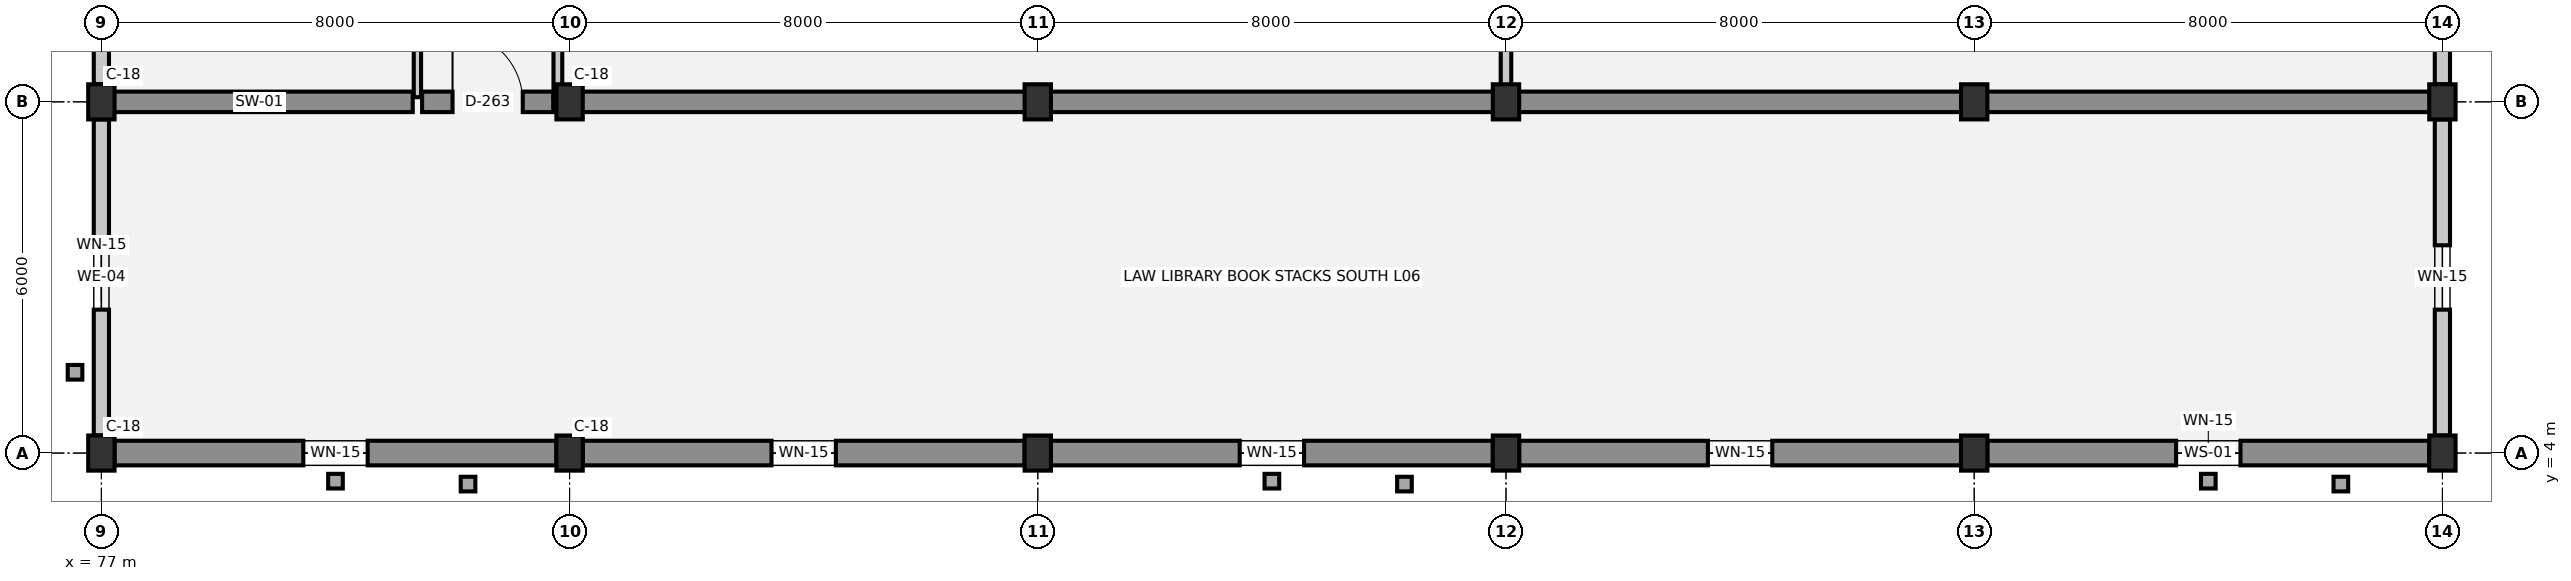
"""IFC4 building model, lengths in metres.
Left out: names, types, materials, properties, quantities, classifications, styles, units other than length and angle.
Written with IfcOpenShell. Run it as: python <this file> out.ifc"""

import sys

from ifc_helpers import new_model, si_unit, direction, frame, frame_2d, origin, origin_2d, place, context, subcontext, project, spatial, rectangle, extrude, element, fill, save


model = new_model("IFC4")
c1 = context("Model", 3, precision=1e-05, world=origin(), true_north=direction((0.0, 1.0)))
c2 = subcontext(c1, "Body", "Model", "MODEL_VIEW")
j1 = project(units=[si_unit("LENGTHUNIT", "METRE"), si_unit("PLANEANGLEUNIT", "RADIAN")], contexts=[c1])
p1 = place(None, origin())
s1 = spatial("IfcSite", under=j1, at=p1, CompositionType="ELEMENT")
p2 = place(p1, origin())
s2 = spatial("IfcBuilding", under=s1, at=p2, CompositionType="ELEMENT")
p3 = place(p2, frame((0.0, 0.0, 22.05)))
s3 = spatial("IfcBuildingStorey", under=s2, at=p3, CompositionType="ELEMENT", Elevation=22.05)
for number, where, z_axis, x_axis in (
    (1, (77.0, 4.0, 0.0), (0.0, 0.0, 1.0), (1.0, 0.0, 0.0)),
    (2, (77.0, 10.0, 0.0), (0.0, 0.0, 1.0), (1.0, 0.0, 0.0)),
    (3, (85.0, 4.0, 0.0), (0.0, 0.0, 1.0), (1.0, 0.0, 0.0)),
    (4, (85.0, 10.0, 0.0), (0.0, 0.0, 1.0), (1.0, 0.0, 0.0)),
    (5, (93.0, 4.0, 0.0), (0.0, 0.0, 1.0), (1.0, 0.0, 0.0)),
    (6, (93.0, 10.0, 0.0), (0.0, 0.0, 1.0), (1.0, 0.0, 0.0)),
    (7, (101.0, 4.0, 0.0), (0.0, 0.0, 1.0), (1.0, 0.0, 0.0)),
    (8, (101.0, 10.0, 0.0), (0.0, 0.0, 1.0), (1.0, 0.0, 0.0)),
    (9, (109.0, 4.0, 0.0), (0.0, 0.0, 1.0), (1.0, 0.0, 0.0)),
    (10, (109.0, 10.0, 0.0), (0.0, 0.0, 1.0), (1.0, 0.0, 0.0)),
    (11, (117.0, 4.0, 0.0), (0.0, 0.0, 1.0), (1.0, 0.0, 0.0)),
    (12, (117.0, 10.0, 0.0), (0.0, 0.0, 1.0), (1.0, 0.0, 0.0)),
):
    element("IfcColumn", number, at=place(p3, frame(where, z_axis=z_axis, x_axis=x_axis)), inside=s3, PredefinedType="COLUMN", context=c2, shape_type="SweptSolid", body=[
        extrude(rectangle(XDim=0.45, YDim=0.6, at=origin_2d()), origin(), (0.0, 0.0, 1.0), 3.75),
    ])
p4 = place(p3, frame((77.0, 4.3, 0.0), z_axis=(0.0, 0.0, 1.0), x_axis=(0.0, 1.0, 0.0)))
e13 = element("IfcWall", 13, at=p4, inside=s3, PredefinedType="SOLIDWALL", context=c2, shape_type="SweptSolid", body=[
    extrude(rectangle(XDim=5.4, YDim=0.26, at=frame_2d((2.7, 0.0))), origin(), (0.0, 0.0, 1.0), 2.71),
])
p5 = place(p4, frame((2.15, 0.0, 0.9)))
e14 = element("IfcOpeningElement", 14, at=p5, cuts=e13, PredefinedType="OPENING", context=c2, shape_type="SweptSolid", body=[
    extrude(rectangle(XDim=1.1, YDim=1.2, at=frame_2d((0.55, 0.6))), frame((0.0, 0.14, 0.0), z_axis=(0.0, -1.0, 0.0), x_axis=(1.0, 0.0, 0.0)), (0.0, 0.0, 1.0), 0.28),
])
p6 = place(p3, frame((77.0, 10.3, 0.0), z_axis=(0.0, 0.0, 1.0), x_axis=(0.0, 1.0, 0.0)))
e15 = element("IfcWall", 15, at=p6, inside=s3, PredefinedType="SOLIDWALL", context=c2, shape_type="SweptSolid", body=[
    extrude(rectangle(XDim=6.4, YDim=0.26, at=frame_2d((3.2, 0.0))), origin(), (0.0, 0.0, 1.0), 2.71),
])
p7 = place(p6, frame((2.1, 0.0, 0.9)))
e16 = element("IfcOpeningElement", 16, at=p7, cuts=e15, PredefinedType="OPENING", context=c2, shape_type="SweptSolid", body=[
    extrude(rectangle(XDim=2.2, YDim=1.0, at=frame_2d((1.1, 0.5))), frame((0.0, 0.14, 0.0), z_axis=(0.0, -1.0, 0.0), x_axis=(1.0, 0.0, 0.0)), (0.0, 0.0, 1.0), 0.28),
])
p8 = place(p3, frame((117.0, 16.7, 0.0), z_axis=(0.0, 0.0, 1.0), x_axis=(0.0, -1.0, 0.0)))
e17 = element("IfcWall", 17, at=p8, inside=s3, PredefinedType="SOLIDWALL", context=c2, shape_type="SweptSolid", body=[
    extrude(rectangle(XDim=6.4, YDim=0.26, at=frame_2d((3.2, 0.0))), origin(), (0.0, 0.0, 1.0), 2.71),
])
p9 = place(p8, frame((2.1, 0.0, 0.9)))
e18 = element("IfcOpeningElement", 18, at=p9, cuts=e17, PredefinedType="OPENING", context=c2, shape_type="SweptSolid", body=[
    extrude(rectangle(XDim=2.2, YDim=1.0, at=frame_2d((1.1, 0.5))), frame((0.0, 0.14, 0.0), z_axis=(0.0, -1.0, 0.0), x_axis=(1.0, 0.0, 0.0)), (0.0, 0.0, 1.0), 0.28),
])
p10 = place(p3, frame((117.0, 9.7, 0.0), z_axis=(0.0, 0.0, 1.0), x_axis=(0.0, -1.0, 0.0)))
e19 = element("IfcWall", 19, at=p10, inside=s3, PredefinedType="SOLIDWALL", context=c2, shape_type="SweptSolid", body=[
    extrude(rectangle(XDim=5.4, YDim=0.26, at=frame_2d((2.7, 0.0))), origin(), (0.0, 0.0, 1.0), 2.71),
])
p11 = place(p10, frame((2.15, 0.0, 0.9)))
e20 = element("IfcOpeningElement", 20, at=p11, cuts=e19, PredefinedType="OPENING", context=c2, shape_type="SweptSolid", body=[
    extrude(rectangle(XDim=1.1, YDim=1.2, at=frame_2d((0.55, 0.6))), frame((0.0, 0.14, 0.0), z_axis=(0.0, -1.0, 0.0), x_axis=(1.0, 0.0, 0.0)), (0.0, 0.0, 1.0), 0.28),
])
p12 = place(p3, frame((116.775, 4.0, 0.0), z_axis=(0.0, 0.0, 1.0), x_axis=(-1.0, 0.0, 0.0)))
e21 = element("IfcWall", 21, at=p12, inside=s3, PredefinedType="SOLIDWALL", context=c2, shape_type="SweptSolid", body=[
    extrude(rectangle(XDim=7.55, YDim=0.42, at=frame_2d((3.775, 0.0))), origin(), (0.0, 0.0, 1.0), 2.71),
])
p13 = place(p12, frame((3.225, 0.0, 0.9)))
e22 = element("IfcOpeningElement", 22, at=p13, cuts=e21, PredefinedType="OPENING", context=c2, shape_type="SweptSolid", body=[
    extrude(rectangle(XDim=1.1, YDim=1.2, at=frame_2d((0.55, 0.6))), frame((0.0, 0.22, 0.0), z_axis=(0.0, -1.0, 0.0), x_axis=(1.0, 0.0, 0.0)), (0.0, 0.0, 1.0), 0.44),
])
p14 = place(p3, frame((108.775, 4.0, 0.0), z_axis=(0.0, 0.0, 1.0), x_axis=(-1.0, 0.0, 0.0)))
e23 = element("IfcWall", 23, at=p14, inside=s3, PredefinedType="SOLIDWALL", context=c2, shape_type="SweptSolid", body=[
    extrude(rectangle(XDim=7.55, YDim=0.42, at=frame_2d((3.775, 0.0))), origin(), (0.0, 0.0, 1.0), 2.71),
])
p15 = place(p14, frame((3.225, 0.0, 0.9)))
e24 = element("IfcOpeningElement", 24, at=p15, cuts=e23, PredefinedType="OPENING", context=c2, shape_type="SweptSolid", body=[
    extrude(rectangle(XDim=1.1, YDim=1.2, at=frame_2d((0.55, 0.6))), frame((0.0, 0.22, 0.0), z_axis=(0.0, -1.0, 0.0), x_axis=(1.0, 0.0, 0.0)), (0.0, 0.0, 1.0), 0.44),
])
p16 = place(p3, frame((100.775, 4.0, 0.0), z_axis=(0.0, 0.0, 1.0), x_axis=(-1.0, 0.0, 0.0)))
e25 = element("IfcWall", 25, at=p16, inside=s3, PredefinedType="SOLIDWALL", context=c2, shape_type="SweptSolid", body=[
    extrude(rectangle(XDim=7.55, YDim=0.42, at=frame_2d((3.775, 0.0))), origin(), (0.0, 0.0, 1.0), 2.71),
])
p17 = place(p16, frame((3.225, 0.0, 0.9)))
e26 = element("IfcOpeningElement", 26, at=p17, cuts=e25, PredefinedType="OPENING", context=c2, shape_type="SweptSolid", body=[
    extrude(rectangle(XDim=1.1, YDim=1.2, at=frame_2d((0.55, 0.6))), frame((0.0, 0.22, 0.0), z_axis=(0.0, -1.0, 0.0), x_axis=(1.0, 0.0, 0.0)), (0.0, 0.0, 1.0), 0.44),
])
p18 = place(p3, frame((92.775, 4.0, 0.0), z_axis=(0.0, 0.0, 1.0), x_axis=(-1.0, 0.0, 0.0)))
e27 = element("IfcWall", 27, at=p18, inside=s3, PredefinedType="SOLIDWALL", context=c2, shape_type="SweptSolid", body=[
    extrude(rectangle(XDim=7.55, YDim=0.42, at=frame_2d((3.775, 0.0))), origin(), (0.0, 0.0, 1.0), 2.71),
])
p19 = place(p18, frame((3.225, 0.0, 0.9)))
e28 = element("IfcOpeningElement", 28, at=p19, cuts=e27, PredefinedType="OPENING", context=c2, shape_type="SweptSolid", body=[
    extrude(rectangle(XDim=1.1, YDim=1.2, at=frame_2d((0.55, 0.6))), frame((0.0, 0.22, 0.0), z_axis=(0.0, -1.0, 0.0), x_axis=(1.0, 0.0, 0.0)), (0.0, 0.0, 1.0), 0.44),
])
p20 = place(p3, frame((84.775, 4.0, 0.0), z_axis=(0.0, 0.0, 1.0), x_axis=(-1.0, 0.0, 0.0)))
e29 = element("IfcWall", 29, at=p20, inside=s3, PredefinedType="SOLIDWALL", context=c2, shape_type="SweptSolid", body=[
    extrude(rectangle(XDim=7.55, YDim=0.42, at=frame_2d((3.775, 0.0))), origin(), (0.0, 0.0, 1.0), 2.71),
])
p21 = place(p20, frame((3.225, 0.0, 0.9)))
e30 = element("IfcOpeningElement", 30, at=p21, cuts=e29, PredefinedType="OPENING", context=c2, shape_type="SweptSolid", body=[
    extrude(rectangle(XDim=1.1, YDim=1.2, at=frame_2d((0.55, 0.6))), frame((0.0, 0.22, 0.0), z_axis=(0.0, -1.0, 0.0), x_axis=(1.0, 0.0, 0.0)), (0.0, 0.0, 1.0), 0.44),
])
p22 = place(p3, frame((77.08, 10.0, 0.0), z_axis=(0.0, 0.0, 1.0), x_axis=(1.0, 0.0, 0.0)))
e31 = element("IfcWall", 31, at=p22, inside=s3, PredefinedType="SHEAR", context=c2, shape_type="SweptSolid", body=[
    extrude(rectangle(XDim=5.24, YDim=0.35, at=frame_2d((2.62, 0.0))), origin(), (0.0, 0.0, 1.0), 3.39),
])
p23 = place(p3, frame((82.48, 10.0, 0.0), z_axis=(0.0, 0.0, 1.0), x_axis=(1.0, 0.0, 0.0)))
e32 = element("IfcWall", 32, at=p23, inside=s3, PredefinedType="SHEAR", context=c2, shape_type="SweptSolid", body=[
    extrude(rectangle(XDim=2.24, YDim=0.35, at=frame_2d((1.12, 0.0))), origin(), (0.0, 0.0, 1.0), 3.39),
])
p24 = place(p23, frame((0.52, 0.0, 0.0)))
e33 = element("IfcOpeningElement", 33, at=p24, cuts=e32, PredefinedType="OPENING", context=c2, shape_type="SweptSolid", body=[
    extrude(rectangle(XDim=1.2, YDim=2.15, at=frame_2d((0.6, 1.075))), frame((0.0, 0.185, 0.0), z_axis=(0.0, -1.0, 0.0), x_axis=(1.0, 0.0, 0.0)), (0.0, 0.0, 1.0), 0.37),
])
p25 = place(p3, frame((84.88, 10.0, 0.0), z_axis=(0.0, 0.0, 1.0), x_axis=(1.0, 0.0, 0.0)))
e34 = element("IfcWall", 34, at=p25, inside=s3, PredefinedType="SHEAR", context=c2, shape_type="SweptSolid", body=[
    extrude(rectangle(XDim=16.04, YDim=0.35, at=frame_2d((8.02, 0.0))), origin(), (0.0, 0.0, 1.0), 3.39),
])
p26 = place(p3, frame((101.08, 10.0, 0.0), z_axis=(0.0, 0.0, 1.0), x_axis=(1.0, 0.0, 0.0)))
e35 = element("IfcWall", 35, at=p26, inside=s3, PredefinedType="SHEAR", context=c2, shape_type="SweptSolid", body=[
    extrude(rectangle(XDim=15.84, YDim=0.35, at=frame_2d((7.92, 0.0))), origin(), (0.0, 0.0, 1.0), 3.39),
])
p27 = place(p3, frame((82.4, 10.08, 0.0), z_axis=(0.0, 0.0, 1.0), x_axis=(0.0, 1.0, 0.0)))
e36 = element("IfcWall", 36, at=p27, inside=s3, PredefinedType="PARTITIONING", context=c2, shape_type="SweptSolid", body=[
    extrude(rectangle(XDim=14.84, YDim=0.125, at=frame_2d((7.42, 0.0))), origin(), (0.0, 0.0, 1.0), 3.39),
])
p28 = place(p27, frame((6.57, 0.0, 0.0)))
e37 = element("IfcOpeningElement", 37, at=p28, cuts=e36, PredefinedType="OPENING", context=c2, shape_type="SweptSolid", body=[
    extrude(rectangle(XDim=1.7, YDim=2.3, at=frame_2d((0.85, 1.15))), frame((0.0, 0.073, 0.0), z_axis=(0.0, -1.0, 0.0), x_axis=(1.0, 0.0, 0.0)), (0.0, 0.0, 1.0), 0.145),
])
p29 = place(p3, frame((84.8, 10.08, 0.0), z_axis=(0.0, 0.0, 1.0), x_axis=(0.0, 1.0, 0.0)))
e38 = element("IfcWall", 38, at=p29, inside=s3, PredefinedType="PARTITIONING", context=c2, shape_type="SweptSolid", body=[
    extrude(rectangle(XDim=14.84, YDim=0.15, at=frame_2d((7.42, 0.0))), origin(), (0.0, 0.0, 1.0), 2.88),
])
p30 = place(p29, frame((4.687, 0.0, 0.0)))
e39 = element("IfcOpeningElement", 39, at=p30, cuts=e38, PredefinedType="OPENING", context=c2, shape_type="SweptSolid", body=[
    extrude(rectangle(XDim=1.75, YDim=2.3, at=frame_2d((0.875, 1.15))), frame((0.0, 0.085, 0.0), z_axis=(0.0, -1.0, 0.0), x_axis=(1.0, 0.0, 0.0)), (0.0, 0.0, 1.0), 0.17),
])
p31 = place(p3, frame((101.0, 10.08, 0.0), z_axis=(0.0, 0.0, 1.0), x_axis=(0.0, 1.0, 0.0)))
e40 = element("IfcWall", 40, at=p31, inside=s3, PredefinedType="PARTITIONING", context=c2, shape_type="SweptSolid", body=[
    extrude(rectangle(XDim=14.84, YDim=0.18, at=frame_2d((7.42, 0.0))), origin(), (0.0, 0.0, 1.0), 2.88),
])
p32 = place(p5, origin())
e41 = element("IfcWindow", 41, at=p32, inside=s3, PartitioningType="SINGLE_PANEL", PredefinedType="WINDOW", context=c2, shape_type="SweptSolid", body=[
    extrude(rectangle(XDim=1.1, YDim=1.2, at=frame_2d((0.55, 0.6))), frame((0.0, 0.03, 0.0), z_axis=(0.0, -1.0, 0.0), x_axis=(1.0, 0.0, 0.0)), (0.0, 0.0, 1.0), 0.06),
])
fill(e14, e41)
p33 = place(p11, origin())
e42 = element("IfcWindow", 42, at=p33, inside=s3, PartitioningType="SINGLE_PANEL", PredefinedType="WINDOW", context=c2, shape_type="SweptSolid", body=[
    extrude(rectangle(XDim=1.1, YDim=1.2, at=frame_2d((0.55, 0.6))), frame((0.0, 0.03, 0.0), z_axis=(0.0, -1.0, 0.0), x_axis=(1.0, 0.0, 0.0)), (0.0, 0.0, 1.0), 0.06),
])
fill(e20, e42)
p34 = place(p13, origin())
e43 = element("IfcWindow", 43, at=p34, inside=s3, PartitioningType="SINGLE_PANEL", PredefinedType="WINDOW", context=c2, shape_type="SweptSolid", body=[
    extrude(rectangle(XDim=1.1, YDim=1.2, at=frame_2d((0.55, 0.6))), frame((0.0, 0.03, 0.0), z_axis=(0.0, -1.0, 0.0), x_axis=(1.0, 0.0, 0.0)), (0.0, 0.0, 1.0), 0.06),
])
fill(e22, e43)
p35 = place(p15, origin())
e44 = element("IfcWindow", 44, at=p35, inside=s3, PartitioningType="SINGLE_PANEL", PredefinedType="WINDOW", context=c2, shape_type="SweptSolid", body=[
    extrude(rectangle(XDim=1.1, YDim=1.2, at=frame_2d((0.55, 0.6))), frame((0.0, 0.03, 0.0), z_axis=(0.0, -1.0, 0.0), x_axis=(1.0, 0.0, 0.0)), (0.0, 0.0, 1.0), 0.06),
])
fill(e24, e44)
p36 = place(p17, origin())
e45 = element("IfcWindow", 45, at=p36, inside=s3, PartitioningType="SINGLE_PANEL", PredefinedType="WINDOW", context=c2, shape_type="SweptSolid", body=[
    extrude(rectangle(XDim=1.1, YDim=1.2, at=frame_2d((0.55, 0.6))), frame((0.0, 0.03, 0.0), z_axis=(0.0, -1.0, 0.0), x_axis=(1.0, 0.0, 0.0)), (0.0, 0.0, 1.0), 0.06),
])
fill(e26, e45)
p37 = place(p19, origin())
e46 = element("IfcWindow", 46, at=p37, inside=s3, PartitioningType="SINGLE_PANEL", PredefinedType="WINDOW", context=c2, shape_type="SweptSolid", body=[
    extrude(rectangle(XDim=1.1, YDim=1.2, at=frame_2d((0.55, 0.6))), frame((0.0, 0.03, 0.0), z_axis=(0.0, -1.0, 0.0), x_axis=(1.0, 0.0, 0.0)), (0.0, 0.0, 1.0), 0.06),
])
fill(e28, e46)
p38 = place(p21, origin())
e47 = element("IfcWindow", 47, at=p38, inside=s3, PartitioningType="SINGLE_PANEL", PredefinedType="WINDOW", context=c2, shape_type="SweptSolid", body=[
    extrude(rectangle(XDim=1.1, YDim=1.2, at=frame_2d((0.55, 0.6))), frame((0.0, 0.03, 0.0), z_axis=(0.0, -1.0, 0.0), x_axis=(1.0, 0.0, 0.0)), (0.0, 0.0, 1.0), 0.06),
])
fill(e30, e47)
p39 = place(p24, origin())
e48 = element("IfcDoor", 48, at=p39, inside=s3, OperationType="SINGLE_SWING_LEFT", PredefinedType="DOOR", context=c2, shape_type="SweptSolid", body=[
    extrude(rectangle(XDim=1.2, YDim=2.15, at=frame_2d((0.6, 1.075))), frame((0.0, 0.025, 0.0), z_axis=(0.0, -1.0, 0.0), x_axis=(1.0, 0.0, 0.0)), (0.0, 0.0, 1.0), 0.05),
])
fill(e33, e48)
save(model, sys.argv[1])
